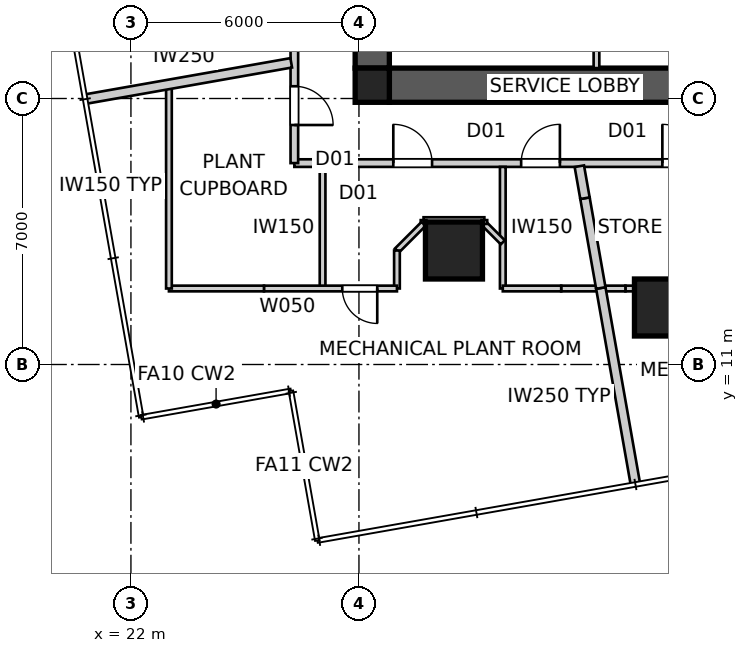
"""IFC4 building model, lengths in metres.
Left out: names, types, materials, properties, quantities, classifications, styles, units other than length and angle.
Written with IfcOpenShell. Run it as: python <this file> out.ifc"""

import sys

from ifc_helpers import new_model, si_unit, direction, frame, frame_2d, origin, origin_2d, place, context, subcontext, project, spatial, polyline, rectangle, outline, extrude, element, fill, save


model = new_model("IFC4")
c1 = context("Model", 3, precision=1e-05, world=origin(), true_north=direction((0.0, 1.0)))
c2 = subcontext(c1, "Body", "Model", "MODEL_VIEW")
j1 = project(units=[si_unit("LENGTHUNIT", "METRE"), si_unit("PLANEANGLEUNIT", "RADIAN")], contexts=[c1])
p1 = place(None, origin())
s1 = spatial("IfcSite", under=j1, at=p1, CompositionType="ELEMENT")
p2 = place(p1, origin())
s2 = spatial("IfcBuilding", under=s1, at=p2, CompositionType="ELEMENT")
p3 = place(p2, frame((0.0, 0.0, 74.4)))
s3 = spatial("IfcBuildingStorey", under=s2, at=p3, CompositionType="ELEMENT", Elevation=74.4)
p4 = place(p3, frame((51.2, 18.35, 0.0), z_axis=(0.0, 0.0, 1.0), x_axis=(-1.0, 0.0, 0.0)))
e1 = element("IfcWall", 1, at=p4, inside=s3, PredefinedType="SHEAR", context=c2, shape_type="SweptSolid", body=[
    extrude(outline(polyline([(0.0, -0.45), (22.4, -0.45), (22.4, -0.025), (22.85, -0.025), (22.85, 0.025), (22.4, 0.025), (22.4, 0.45), (0.0, 0.45), (0.0, 0.025), (-0.45, 0.025), (-0.45, -0.025), (0.0, -0.025), (0.0, -0.45)])), origin(), (0.0, 0.0, 1.0), 5.0),
])
p5 = place(p3, frame((28.35, 41.2, 0.0), z_axis=(0.0, 0.0, 1.0), x_axis=(0.0, -1.0, 0.0)))
e2 = element("IfcWall", 2, at=p5, inside=s3, PredefinedType="SHEAR", context=c2, shape_type="SweptSolid", body=[
    extrude(outline(polyline([(0.0, -0.45), (22.4, -0.45), (22.4, -0.025), (22.85, -0.025), (22.85, 0.025), (22.4, 0.025), (22.4, 0.45), (0.0, 0.45), (0.0, 0.025), (-0.45, 0.025), (-0.45, -0.025), (0.0, -0.025), (0.0, -0.45)])), origin(), (0.0, 0.0, 1.0), 5.0),
])
p6 = place(p5, frame((11.14, 0.0, 0.0)))
e3 = element("IfcOpeningElement", 3, at=p6, cuts=e2, PredefinedType="OPENING", context=c2, shape_type="SweptSolid", body=[
    extrude(rectangle(XDim=1.02, YDim=2.4, at=frame_2d((0.51, 1.2))), frame((0.0, 0.46, 0.0), z_axis=(0.0, -1.0, 0.0), x_axis=(1.0, 0.0, 0.0)), (0.0, 0.0, 1.0), 0.92),
])
p7 = place(p3, frame((28.35, 18.35, 0.0), z_axis=(0.0, 0.0, 1.0), x_axis=(1.0, 0.0, 0.0)))
e4 = element("IfcColumn", 4, at=p7, inside=s3, PredefinedType="COLUMN", context=c2, shape_type="SweptSolid", body=[
    extrude(rectangle(XDim=0.9, YDim=0.9, at=origin_2d()), origin(), (0.0, 0.0, 1.0), 5.0),
])
for number, where, z_axis, x_axis in (
    (5, (30.5, 14.0, 0.0), (0.0, 0.0, 1.0), (1.0, 0.0, 0.0)),
    (6, (36.0, 12.5, 0.0), (0.0, 0.0, 1.0), (1.0, 0.0, 0.0)),
):
    element("IfcColumn", number, at=place(p3, frame(where, z_axis=z_axis, x_axis=x_axis)), inside=s3, PredefinedType="COLUMN", context=c2, shape_type="SweptSolid", body=[
        extrude(rectangle(XDim=1.5, YDim=1.5, at=origin_2d()), origin(), (0.0, 0.0, 1.0), 5.0),
    ])
p8 = place(p3, frame((26.3, 16.3, 0.0), z_axis=(0.0, 0.0, 1.0), x_axis=(1.0, 0.0, 0.0)))
e7 = element("IfcWall", 7, at=p8, inside=s3, PredefinedType="PARTITIONING", context=c2, shape_type="SweptSolid", body=[
    extrude(rectangle(XDim=27.4, YDim=0.2, at=frame_2d((13.7, 0.0))), origin(), (0.0, 0.0, 1.0), 4.85),
])
p9 = place(p8, frame((20.916, 0.0, 0.0)))
e8 = element("IfcOpeningElement", 8, at=p9, cuts=e7, PredefinedType="OPENING", context=c2, shape_type="SweptSolid", body=[
    extrude(rectangle(XDim=1.02, YDim=2.34, at=frame_2d((0.51, 1.17))), frame((0.0, 0.11, 0.0), z_axis=(0.0, -1.0, 0.0), x_axis=(1.0, 0.0, 0.0)), (0.0, 0.0, 1.0), 0.22),
])
p10 = place(p8, frame((9.684, 0.0, 0.0)))
e9 = element("IfcOpeningElement", 9, at=p10, cuts=e7, PredefinedType="OPENING", context=c2, shape_type="SweptSolid", body=[
    extrude(rectangle(XDim=1.02, YDim=2.34, at=frame_2d((0.51, 1.17))), frame((0.0, 0.11, 0.0), z_axis=(0.0, -1.0, 0.0), x_axis=(1.0, 0.0, 0.0)), (0.0, 0.0, 1.0), 0.22),
])
p11 = place(p8, frame((15.011, 0.0, 0.0)))
e10 = element("IfcOpeningElement", 10, at=p11, cuts=e7, PredefinedType="OPENING", context=c2, shape_type="SweptSolid", body=[
    extrude(rectangle(XDim=1.02, YDim=2.34, at=frame_2d((0.51, 1.17))), frame((0.0, 0.11, 0.0), z_axis=(0.0, -1.0, 0.0), x_axis=(1.0, 0.0, 0.0)), (0.0, 0.0, 1.0), 0.22),
])
p12 = place(p8, frame((2.604, 0.0, 0.0)))
e11 = element("IfcOpeningElement", 11, at=p12, cuts=e7, PredefinedType="OPENING", context=c2, shape_type="SweptSolid", body=[
    extrude(rectangle(XDim=1.02, YDim=2.34, at=frame_2d((0.51, 1.17))), frame((0.0, 0.11, 0.0), z_axis=(0.0, -1.0, 0.0), x_axis=(1.0, 0.0, 0.0)), (0.0, 0.0, 1.0), 0.22),
])
p13 = place(p8, frame((5.968, 0.0, 0.0)))
e12 = element("IfcOpeningElement", 12, at=p13, cuts=e7, PredefinedType="OPENING", context=c2, shape_type="SweptSolid", body=[
    extrude(rectangle(XDim=1.02, YDim=2.34, at=frame_2d((0.51, 1.17))), frame((0.0, 0.11, 0.0), z_axis=(0.0, -1.0, 0.0), x_axis=(1.0, 0.0, 0.0)), (0.0, 0.0, 1.0), 0.22),
])
p14 = place(p3, frame((26.3, 43.7, 0.0), z_axis=(0.0, 0.0, 1.0), x_axis=(0.0, -1.0, 0.0)))
e13 = element("IfcWall", 13, at=p14, inside=s3, PredefinedType="PARTITIONING", context=c2, shape_type="SweptSolid", body=[
    extrude(rectangle(XDim=27.4, YDim=0.2, at=frame_2d((13.7, 0.0))), origin(), (0.0, 0.0, 1.0), 4.85),
])
p15 = place(p14, frame((15.588, 0.0, 0.0)))
e14 = element("IfcOpeningElement", 14, at=p15, cuts=e13, PredefinedType="OPENING", context=c2, shape_type="SweptSolid", body=[
    extrude(rectangle(XDim=1.02, YDim=2.34, at=frame_2d((0.51, 1.17))), frame((0.0, 0.11, 0.0), z_axis=(0.0, -1.0, 0.0), x_axis=(1.0, 0.0, 0.0)), (0.0, 0.0, 1.0), 0.22),
])
p16 = place(p14, frame((2.604, 0.0, 0.0)))
e15 = element("IfcOpeningElement", 15, at=p16, cuts=e13, PredefinedType="OPENING", context=c2, shape_type="SweptSolid", body=[
    extrude(rectangle(XDim=1.02, YDim=2.34, at=frame_2d((0.51, 1.17))), frame((0.0, 0.11, 0.0), z_axis=(0.0, -1.0, 0.0), x_axis=(1.0, 0.0, 0.0)), (0.0, 0.0, 1.0), 0.22),
])
p17 = place(p14, frame((25.378, 0.0, 0.0)))
e16 = element("IfcOpeningElement", 16, at=p17, cuts=e13, PredefinedType="OPENING", context=c2, shape_type="SweptSolid", body=[
    extrude(rectangle(XDim=1.02, YDim=2.34, at=frame_2d((0.51, 1.17))), frame((0.0, 0.11, 0.0), z_axis=(0.0, -1.0, 0.0), x_axis=(1.0, 0.0, 0.0)), (0.0, 0.0, 1.0), 0.22),
])
p18 = place(p14, frame((5.968, 0.0, 0.0)))
e17 = element("IfcOpeningElement", 17, at=p18, cuts=e13, PredefinedType="OPENING", context=c2, shape_type="SweptSolid", body=[
    extrude(rectangle(XDim=1.02, YDim=2.34, at=frame_2d((0.51, 1.17))), frame((0.0, 0.11, 0.0), z_axis=(0.0, -1.0, 0.0), x_axis=(1.0, 0.0, 0.0)), (0.0, 0.0, 1.0), 0.22),
])
p19 = place(p3, frame((35.276, 7.843, 0.0), z_axis=(0.0, 0.0, 1.0), x_axis=(-0.173615529166, 0.984813509266, 0.0)))
e18 = element("IfcWall", 18, at=p19, inside=s3, PredefinedType="PARTITIONING", context=c2, shape_type="SweptSolid", body=[
    extrude(rectangle(XDim=5.25, YDim=0.25, at=frame_2d((2.625, 0.0))), origin(), (0.0, 0.0, 1.0), 4.85),
])
p20 = place(p3, frame((34.364, 13.013, 0.0), z_axis=(0.0, 0.0, 1.0), x_axis=(-0.17362866226, 0.984811193906, 0.0)))
e19 = element("IfcWall", 19, at=p20, inside=s3, PredefinedType="PARTITIONING", context=c2, shape_type="SweptSolid", body=[
    extrude(rectangle(XDim=2.4, YDim=0.25, at=frame_2d((1.2, 0.0))), origin(), (0.0, 0.0, 1.0), 4.322),
])
p21 = place(p3, frame((33.948, 15.376, 0.0), z_axis=(0.0, 0.0, 1.0), x_axis=(-0.173752728326, 0.984789312188, 0.0)))
e20 = element("IfcWall", 20, at=p21, inside=s3, PredefinedType="PARTITIONING", context=c2, shape_type="SweptSolid", body=[
    extrude(rectangle(XDim=0.854, YDim=0.25, at=frame_2d((0.427, 0.0))), origin(), (0.0, 0.0, 1.0), 4.85),
])
p22 = place(p3, frame((20.795, 17.982, 0.0), z_axis=(0.0, 0.0, 1.0), x_axis=(0.984803192417, 0.173674040102, 0.0)))
e21 = element("IfcWall", 21, at=p22, inside=s3, PredefinedType="PARTITIONING", context=c2, shape_type="SweptSolid", body=[
    extrude(rectangle(XDim=5.506, YDim=0.25, at=frame_2d((2.753, 0.0))), origin(), (0.0, 0.0, 1.0), 4.85),
])
p23 = place(p3, frame((34.25, 18.8, 0.0), z_axis=(0.0, 0.0, 1.0), x_axis=(0.0, 1.0, 0.0)))
e22 = element("IfcWall", 22, at=p23, inside=s3, PredefinedType="SOLIDWALL", context=c2, shape_type="SweptSolid", body=[
    extrude(rectangle(XDim=5.9, YDim=0.15, at=frame_2d((2.95, 0.0))), origin(), (0.0, 0.0, 1.0), 4.85),
])
for number, where, z_axis, x_axis in (
    (23, (27.043, 13.0, 0.0), (0.0, 0.0, 1.0), (0.0, 1.0, 0.0)),
    (24, (31.785, 16.2, 0.0), (0.0, 0.0, 1.0), (0.0, -1.0, 0.0)),
):
    element("IfcWall", number, at=place(p3, frame(where, z_axis=z_axis, x_axis=x_axis)), inside=s3, PredefinedType="SOLIDWALL", context=c2, shape_type="SweptSolid", body=[
        extrude(rectangle(XDim=3.2, YDim=0.15, at=frame_2d((1.6, 0.0))), origin(), (0.0, 0.0, 1.0), 4.85),
    ])
p24 = place(p3, frame((31.785, 14.215, 0.0), z_axis=(0.0, 0.0, 1.0), x_axis=(-0.707106781187, 0.707106781187, 0.0)))
e25 = element("IfcWall", 25, at=p24, inside=s3, PredefinedType="SOLIDWALL", context=c2, shape_type="SweptSolid", body=[
    extrude(rectangle(XDim=0.686, YDim=0.15, at=frame_2d((0.343, 0.0))), origin(), (0.0, 0.0, 1.0), 4.85),
])
p25 = place(p3, frame((31.3, 14.8, 0.0), z_axis=(0.0, 0.0, 1.0), x_axis=(-1.0, 0.0, 0.0)))
e26 = element("IfcWall", 26, at=p25, inside=s3, PredefinedType="SOLIDWALL", context=c2, shape_type="SweptSolid", body=[
    extrude(rectangle(XDim=1.6, YDim=0.15, at=frame_2d((0.8, 0.0))), origin(), (0.0, 0.0, 1.0), 4.85),
])
p26 = place(p3, frame((29.7, 14.7, 0.0), z_axis=(0.0, 0.0, 1.0), x_axis=(-0.707106781187, -0.707106781187, 0.0)))
e27 = element("IfcWall", 27, at=p26, inside=s3, PredefinedType="SOLIDWALL", context=c2, shape_type="SweptSolid", body=[
    extrude(rectangle(XDim=0.99, YDim=0.15, at=frame_2d((0.495, 0.0))), origin(), (0.0, 0.0, 1.0), 4.85),
])
p27 = place(p3, frame((29.0, 14.0, 0.0), z_axis=(0.0, 0.0, 1.0), x_axis=(0.0, -1.0, 0.0)))
e28 = element("IfcWall", 28, at=p27, inside=s3, PredefinedType="SOLIDWALL", context=c2, shape_type="SweptSolid", body=[
    extrude(rectangle(XDim=1.0, YDim=0.15, at=frame_2d((0.5, 0.0))), origin(), (0.0, 0.0, 1.0), 4.85),
])
p28 = place(p3, frame((29.0, 13.0, 0.0), z_axis=(0.0, 0.0, 1.0), x_axis=(-1.0, 0.0, 0.0)))
e29 = element("IfcWall", 29, at=p28, inside=s3, PredefinedType="SOLIDWALL", context=c2, shape_type="SweptSolid", body=[
    extrude(rectangle(XDim=3.5, YDim=0.15, at=frame_2d((1.75, 0.0))), origin(), (0.0, 0.0, 1.0), 4.85),
])
p29 = place(p28, frame((0.519, 0.0, 0.0)))
e30 = element("IfcOpeningElement", 30, at=p29, cuts=e29, PredefinedType="OPENING", context=c2, shape_type="SweptSolid", body=[
    extrude(rectangle(XDim=0.92, YDim=2.1, at=frame_2d((0.46, 1.05))), frame((0.0, 0.085, 0.0), z_axis=(0.0, -1.0, 0.0), x_axis=(1.0, 0.0, 0.0)), (0.0, 0.0, 1.0), 0.17),
])
p30 = place(p3, frame((25.5, 13.0, 0.0), z_axis=(0.0, 0.0, 1.0), x_axis=(-1.0, 0.0, 0.0)))
e31 = element("IfcWall", 31, at=p30, inside=s3, PredefinedType="SOLIDWALL", context=c2, shape_type="SweptSolid", body=[
    extrude(rectangle(XDim=2.5, YDim=0.15, at=frame_2d((1.25, 0.0))), origin(), (0.0, 0.0, 1.0), 4.049),
])
p31 = place(p3, frame((23.0, 13.0, 0.0), z_axis=(0.0, 0.0, 1.0), x_axis=(0.0, 1.0, 0.0)))
e32 = element("IfcWall", 32, at=p31, inside=s3, PredefinedType="SOLIDWALL", context=c2, shape_type="SweptSolid", body=[
    extrude(rectangle(XDim=5.371, YDim=0.15, at=frame_2d((2.686, 0.0))), origin(), (0.0, 0.0, 1.0), 4.85),
])
p32 = place(p3, frame((44.988, 13.0, 0.0), z_axis=(0.0, 0.0, 1.0), x_axis=(-1.0, 0.0, 0.0)))
e33 = element("IfcWall", 33, at=p32, inside=s3, PredefinedType="SOLIDWALL", context=c2, shape_type="SweptSolid", body=[
    extrude(rectangle(XDim=9.977, YDim=0.15, at=frame_2d((4.988, 0.0))), origin(), (0.0, 0.0, 1.0), 4.85),
])
p33 = place(p3, frame((35.012, 13.0, 0.0), z_axis=(0.0, 0.0, 1.0), x_axis=(-1.0, 0.0, 0.0)))
e34 = element("IfcWall", 34, at=p33, inside=s3, PredefinedType="SOLIDWALL", context=c2, shape_type="SweptSolid", body=[
    extrude(rectangle(XDim=1.69, YDim=0.15, at=frame_2d((0.845, 0.0))), origin(), (0.0, 0.0, 1.0), 3.85),
])
p34 = place(p3, frame((33.322, 13.0, 0.0), z_axis=(0.0, 0.0, 1.0), x_axis=(-1.0, 0.0, 0.0)))
e35 = element("IfcWall", 35, at=p34, inside=s3, PredefinedType="SOLIDWALL", context=c2, shape_type="SweptSolid", body=[
    extrude(rectangle(XDim=1.537, YDim=0.15, at=frame_2d((0.768, 0.0))), origin(), (0.0, 0.0, 1.0), 4.85),
])
for number, where, z_axis, x_axis in (
    (36, (31.3, 14.8, 0.0), (0.0, 0.0, 1.0), (0.0, -1.0, 0.0)),
    (37, (29.7, 14.8, 0.0), (0.0, 0.0, 1.0), (0.0, -1.0, 0.0)),
):
    element("IfcWall", number, at=place(p3, frame(where, z_axis=z_axis, x_axis=x_axis)), inside=s3, PredefinedType="SOLIDWALL", context=c2, shape_type="SweptSolid", body=[
        extrude(rectangle(XDim=0.1, YDim=0.15, at=frame_2d((0.05, 0.0))), origin(), (0.0, 0.0, 1.0), 4.85),
    ])
p35 = place(p10, origin())
e38 = element("IfcDoor", 38, at=p35, inside=s3, OperationType="SINGLE_SWING_LEFT", PredefinedType="DOOR", context=c2, shape_type="SweptSolid", body=[
    extrude(rectangle(XDim=1.02, YDim=2.34, at=frame_2d((0.51, 1.17))), frame((0.0, 0.025, 0.0), z_axis=(0.0, -1.0, 0.0), x_axis=(1.0, 0.0, 0.0)), (0.0, 0.0, 1.0), 0.05),
])
fill(e9, e38)
p36 = place(p12, origin())
e39 = element("IfcDoor", 39, at=p36, inside=s3, OperationType="SINGLE_SWING_LEFT", PredefinedType="DOOR", context=c2, shape_type="SweptSolid", body=[
    extrude(rectangle(XDim=1.02, YDim=2.34, at=frame_2d((0.51, 1.17))), frame((0.0, 0.025, 0.0), z_axis=(0.0, -1.0, 0.0), x_axis=(1.0, 0.0, 0.0)), (0.0, 0.0, 1.0), 0.05),
])
fill(e11, e39)
p37 = place(p17, origin())
e40 = element("IfcDoor", 40, at=p37, inside=s3, OperationType="SINGLE_SWING_RIGHT", PredefinedType="DOOR", context=c2, shape_type="SweptSolid", body=[
    extrude(rectangle(XDim=1.02, YDim=2.34, at=frame_2d((0.51, 1.17))), frame((0.0, 0.025, 0.0), z_axis=(0.0, -1.0, 0.0), x_axis=(1.0, 0.0, 0.0)), (0.0, 0.0, 1.0), 0.05),
])
fill(e16, e40)
p38 = place(p13, origin())
e41 = element("IfcDoor", 41, at=p38, inside=s3, OperationType="SINGLE_SWING_RIGHT", PredefinedType="DOOR", context=c2, shape_type="SweptSolid", body=[
    extrude(rectangle(XDim=1.02, YDim=2.34, at=frame_2d((0.51, 1.17))), frame((0.0, 0.025, 0.0), z_axis=(0.0, -1.0, 0.0), x_axis=(1.0, 0.0, 0.0)), (0.0, 0.0, 1.0), 0.05),
])
fill(e12, e41)
p39 = place(p29, origin())
e42 = element("IfcDoor", 42, at=p39, inside=s3, OperationType="SINGLE_SWING_LEFT", PredefinedType="DOOR", context=c2, shape_type="SweptSolid", body=[
    extrude(rectangle(XDim=0.92, YDim=2.1, at=frame_2d((0.46, 1.05))), frame((0.0, 0.025, 0.0), z_axis=(0.0, -1.0, 0.0), x_axis=(1.0, 0.0, 0.0)), (0.0, 0.0, 1.0), 0.05),
])
fill(e30, e42)
save(model, sys.argv[1])
